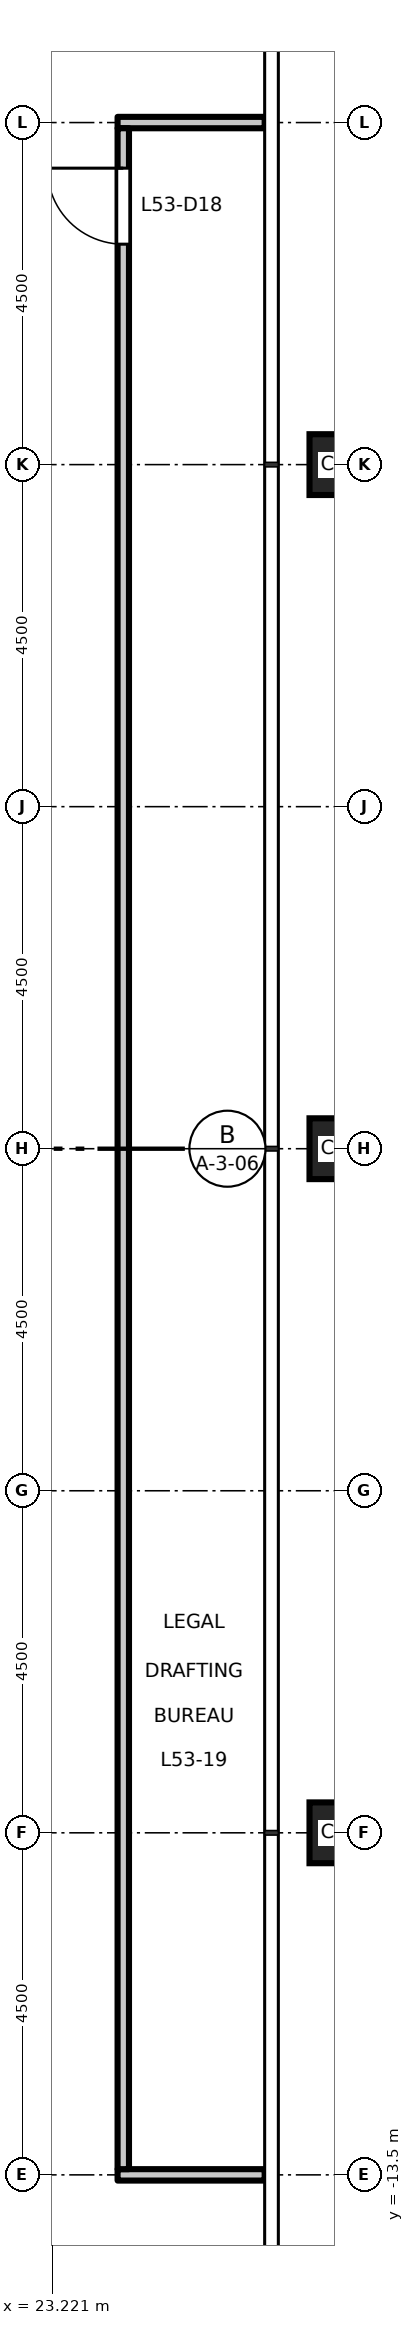
"""IFC4 building model, lengths in metres.
Left out: names, types, materials, properties, quantities, classifications, styles, units other than length and angle.
Written with IfcOpenShell. Run it as: python <this file> out.ifc"""

import sys

from ifc_helpers import new_model, si_unit, direction, frame, frame_2d, origin, origin_2d, place, context, subcontext, project, spatial, rectangle, hollow_rectangle, extrude, element, fill, save


model = new_model("IFC4")
c1 = context("Model", 3, precision=1e-05, world=origin(), true_north=direction((0.0, 1.0)))
c2 = subcontext(c1, "Body", "Model", "MODEL_VIEW")
j1 = project(units=[si_unit("LENGTHUNIT", "METRE"), si_unit("PLANEANGLEUNIT", "RADIAN")], contexts=[c1])
p1 = place(None, origin())
s1 = spatial("IfcSite", under=j1, at=p1, CompositionType="ELEMENT")
p2 = place(p1, origin())
s2 = spatial("IfcBuilding", under=s1, at=p2, CompositionType="ELEMENT")
p3 = place(p2, frame((0.0, 0.0, 246.7)))
s3 = spatial("IfcBuildingStorey", under=s2, at=p3, CompositionType="ELEMENT", Elevation=246.7)
for number, where, z_axis, x_axis in (
    (1, (27.0, -9.0, 0.0), (0.0, 0.0, 1.0), (1.0, 0.0, 0.0)),
    (2, (27.0, 0.0, 0.0), (0.0, 0.0, 1.0), (1.0, 0.0, 0.0)),
    (3, (27.0, 9.0, 0.0), (0.0, 0.0, 1.0), (1.0, 0.0, 0.0)),
):
    element("IfcColumn", number, at=place(p3, frame(where, z_axis=z_axis, x_axis=x_axis)), inside=s3, PredefinedType="COLUMN", context=c2, shape_type="SweptSolid", body=[
        extrude(hollow_rectangle(XDim=0.8, YDim=0.8, WallThickness=0.045, at=origin_2d()), origin(), (0.0, 0.0, 1.0), 4.5),
    ])
p4 = place(p3, frame((24.075, -13.5, 0.0), z_axis=(0.0, 0.0, 1.0), x_axis=(1.0, 0.0, 0.0)))
e4 = element("IfcWall", 4, at=p4, inside=s3, PredefinedType="PARTITIONING", context=c2, shape_type="SweptSolid", body=[
    extrude(rectangle(XDim=1.935, YDim=0.15, at=frame_2d((0.968, 0.0))), origin(), (0.0, 0.0, 1.0), 3.95),
])
p5 = place(p3, frame((24.075, 13.5, 0.0), z_axis=(0.0, 0.0, 1.0), x_axis=(1.0, 0.0, 0.0)))
e5 = element("IfcWall", 5, at=p5, inside=s3, PredefinedType="PARTITIONING", context=c2, shape_type="SweptSolid", body=[
    extrude(rectangle(XDim=1.935, YDim=0.15, at=frame_2d((0.968, 0.0))), origin(), (0.0, 0.0, 1.0), 4.35),
])
p6 = place(p3, frame((24.15, -13.425, 0.0), z_axis=(0.0, 0.0, 1.0), x_axis=(0.0, 1.0, 0.0)))
e6 = element("IfcWall", 6, at=p6, inside=s3, PredefinedType="PARTITIONING", context=c2, shape_type="SweptSolid", body=[
    extrude(rectangle(XDim=26.85, YDim=0.15, at=frame_2d((13.425, 0.0))), origin(), (0.0, 0.0, 1.0), 4.35),
])
p7 = place(p6, frame((25.325, 0.0, 0.0)))
e7 = element("IfcOpeningElement", 7, at=p7, cuts=e6, PredefinedType="OPENING", context=c2, shape_type="SweptSolid", body=[
    extrude(rectangle(XDim=1.0, YDim=2.1, at=frame_2d((0.5, 1.05))), frame((0.0, 0.085, 0.0), z_axis=(0.0, -1.0, 0.0), x_axis=(1.0, 0.0, 0.0)), (0.0, 0.0, 1.0), 0.17),
])
p8 = place(p7, origin())
e8 = element("IfcDoor", 8, at=p8, inside=s3, OperationType="SINGLE_SWING_RIGHT", PredefinedType="DOOR", context=c2, shape_type="SweptSolid", body=[
    extrude(rectangle(XDim=1.0, YDim=2.1, at=frame_2d((0.5, 1.05))), frame((0.0, 0.025, 0.0), z_axis=(0.0, -1.0, 0.0), x_axis=(1.0, 0.0, 0.0)), (0.0, 0.0, 1.0), 0.05),
])
fill(e7, e8)
save(model, sys.argv[1])
